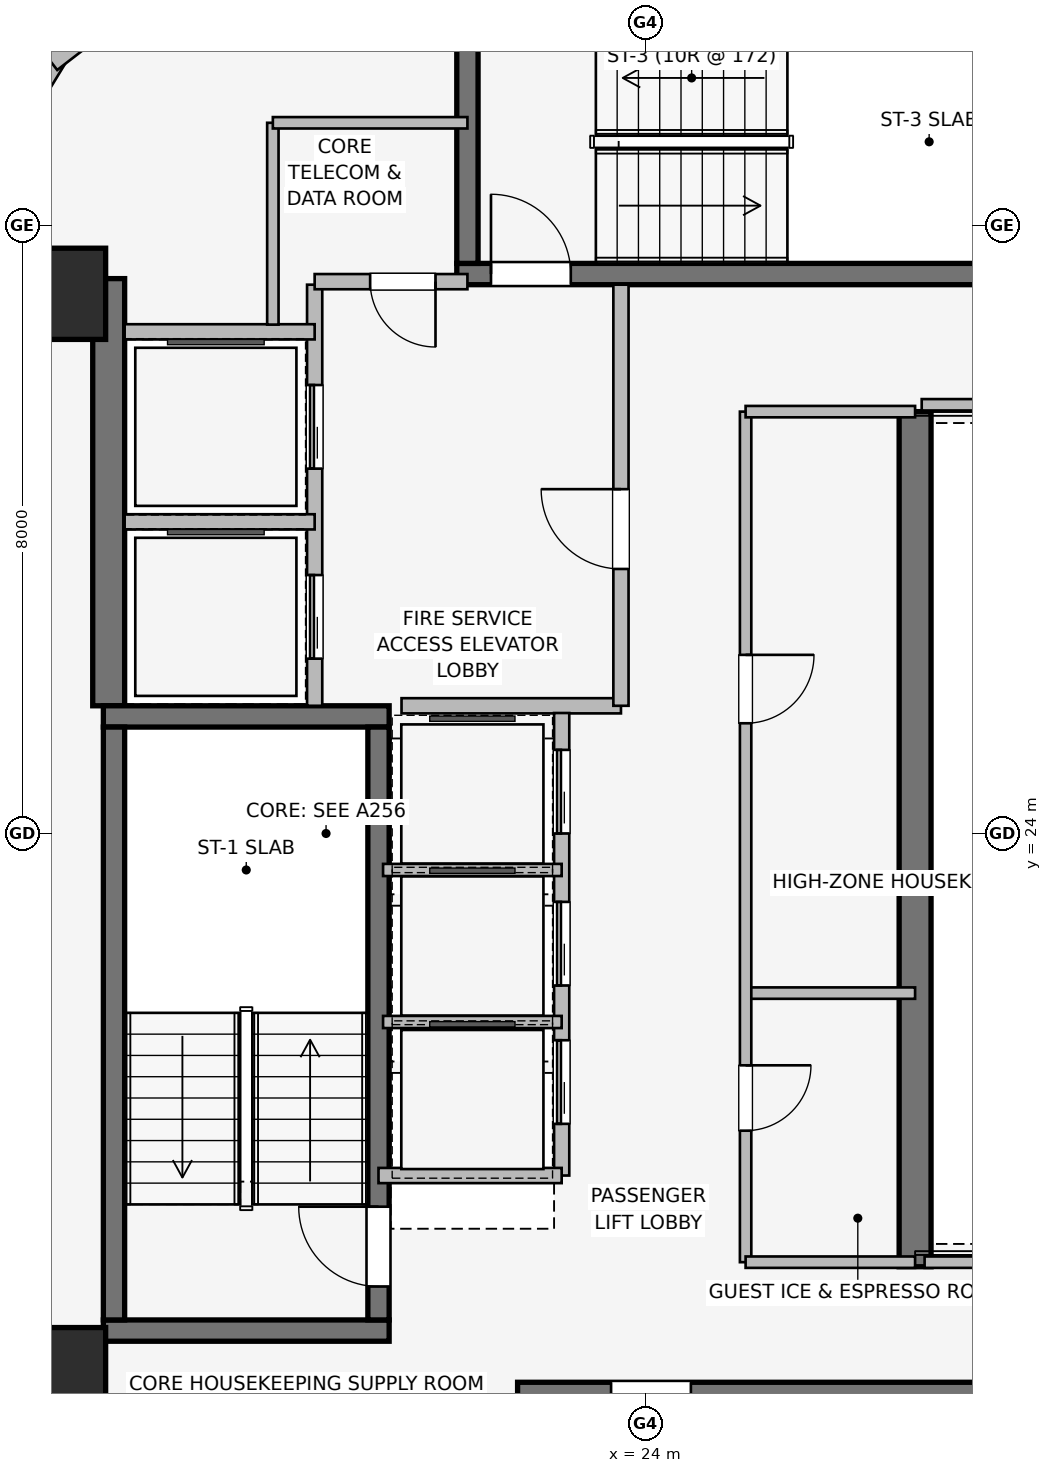
"""IFC4 building model, lengths in metres.
Left out: names, types, materials, properties, quantities, classifications, styles, units other than length and angle.
Written with IfcOpenShell. Run it as: python <this file> out.ifc"""

import sys

from ifc_helpers import new_model, si_unit, direction, frame, frame_2d, origin, origin_2d, place, context, subcontext, project, spatial, rectangle, extrude, element, fill, save


model = new_model("IFC4")
c1 = context("Model", 3, precision=1e-05, world=origin(), true_north=direction((0.0, 1.0)))
c2 = subcontext(c1, "Body", "Model", "MODEL_VIEW")
j1 = project(units=[si_unit("LENGTHUNIT", "METRE"), si_unit("PLANEANGLEUNIT", "RADIAN")], contexts=[c1])
p1 = place(None, origin())
s1 = spatial("IfcSite", under=j1, at=p1, CompositionType="ELEMENT")
p2 = place(p1, origin())
s2 = spatial("IfcBuilding", under=s1, at=p2, CompositionType="ELEMENT")
p3 = place(p2, frame((0.0, 0.0, 199.9)))
s3 = spatial("IfcBuildingStorey", under=s2, at=p3, CompositionType="ELEMENT", Elevation=199.9)
p4 = place(p3, frame((16.94, 25.68, 0.0), z_axis=(0.0, 0.0, 1.0), x_axis=(0.0, 1.0, 0.0)))
e1 = element("IfcWall", 1, at=p4, inside=s3, PredefinedType="SHEAR", context=c2, shape_type="SweptSolid", body=[
    extrude(rectangle(XDim=5.62, YDim=0.42, at=frame_2d((2.81, 0.0))), origin(), (0.0, 0.0, 1.0), 3.45),
])
p5 = place(p3, frame((27.55, 29.55, 0.0), z_axis=(0.0, 0.0, 1.0), x_axis=(0.0, -1.0, 0.0)))
e2 = element("IfcWall", 2, at=p5, inside=s3, PredefinedType="SHEAR", context=c2, shape_type="SweptSolid", body=[
    extrude(rectangle(XDim=11.25, YDim=0.42, at=frame_2d((5.625, 0.0))), origin(), (0.0, 0.0, 1.0), 3.45),
])
for number, where, z_axis, x_axis in (
    (3, (16.87, 17.46, 0.0), (0.0, 0.0, 1.0), (1.0, 0.0, 0.0)),
    (4, (20.63, 25.54, 0.0), (0.0, 0.0, 1.0), (-1.0, 0.0, 0.0)),
):
    element("IfcWall", number, at=place(p3, frame(where, z_axis=z_axis, x_axis=x_axis)), inside=s3, PredefinedType="SHEAR", context=c2, shape_type="SweptSolid", body=[
        extrude(rectangle(XDim=3.76, YDim=0.28, at=frame_2d((1.88, 0.0))), origin(), (0.0, 0.0, 1.0), 3.45),
    ])
p6 = place(p3, frame((17.01, 25.4, 0.0), z_axis=(0.0, 0.0, 1.0), x_axis=(0.0, -1.0, 0.0)))
e5 = element("IfcWall", 5, at=p6, inside=s3, PredefinedType="SHEAR", context=c2, shape_type="SweptSolid", body=[
    extrude(rectangle(XDim=7.8, YDim=0.28, at=frame_2d((3.9, 0.0))), origin(), (0.0, 0.0, 1.0), 3.45),
])
p7 = place(p3, frame((20.49, 17.6, 0.0), z_axis=(0.0, 0.0, 1.0), x_axis=(0.0, 1.0, 0.0)))
e6 = element("IfcWall", 6, at=p7, inside=s3, PredefinedType="SHEAR", context=c2, shape_type="SweptSolid", body=[
    extrude(rectangle(XDim=7.8, YDim=0.28, at=frame_2d((3.9, 0.0))), origin(), (0.0, 0.0, 1.0), 3.45),
])
p8 = place(p7, frame((0.44, 0.0, 0.0)))
e7 = element("IfcOpeningElement", 7, at=p8, cuts=e6, PredefinedType="OPENING", context=c2, shape_type="SweptSolid", body=[
    extrude(rectangle(XDim=1.05, YDim=2.0, at=frame_2d((0.525, 1.0))), frame((0.0, 0.15, 0.0), z_axis=(0.0, -1.0, 0.0), x_axis=(1.0, 0.0, 0.0)), (0.0, 0.0, 1.0), 0.3),
])
p9 = place(p3, frame((30.68, 16.64, 0.0), z_axis=(0.0, 0.0, 1.0), x_axis=(-1.0, 0.0, 0.0)))
e8 = element("IfcWall", 8, at=p9, inside=s3, PredefinedType="SHEAR", context=c2, shape_type="SweptSolid", body=[
    extrude(rectangle(XDim=8.36, YDim=0.28, at=frame_2d((4.18, 0.0))), origin(), (0.0, 0.0, 1.0), 3.45),
])
p10 = place(p9, frame((6.08, 0.0, 0.0)))
e9 = element("IfcOpeningElement", 9, at=p10, cuts=e8, PredefinedType="OPENING", context=c2, shape_type="SweptSolid", body=[
    extrude(rectangle(XDim=1.05, YDim=2.0, at=frame_2d((0.525, 1.0))), frame((0.0, 0.15, 0.0), z_axis=(0.0, -1.0, 0.0), x_axis=(1.0, 0.0, 0.0)), (0.0, 0.0, 1.0), 0.3),
])
p11 = place(p3, frame((21.52, 31.36, 0.0), z_axis=(0.0, 0.0, 1.0), x_axis=(1.0, 0.0, 0.0)))
e10 = element("IfcWall", 10, at=p11, inside=s3, PredefinedType="SHEAR", context=c2, shape_type="SweptSolid", body=[
    extrude(rectangle(XDim=8.36, YDim=0.28, at=frame_2d((4.18, 0.0))), origin(), (0.0, 0.0, 1.0), 3.45),
])
p12 = place(p11, frame((0.45, 0.0, 0.0)))
e11 = element("IfcOpeningElement", 11, at=p12, cuts=e10, PredefinedType="OPENING", context=c2, shape_type="SweptSolid", body=[
    extrude(rectangle(XDim=1.05, YDim=2.0, at=frame_2d((0.525, 1.0))), frame((0.0, 0.15, 0.0), z_axis=(0.0, -1.0, 0.0), x_axis=(1.0, 0.0, 0.0)), (0.0, 0.0, 1.0), 0.3),
])
p13 = place(p3, frame((21.66, 34.7, 0.0), z_axis=(0.0, 0.0, 1.0), x_axis=(0.0, -1.0, 0.0)))
e12 = element("IfcWall", 12, at=p13, inside=s3, PredefinedType="SHEAR", context=c2, shape_type="SweptSolid", body=[
    extrude(rectangle(XDim=3.2, YDim=0.28, at=frame_2d((1.6, 0.0))), origin(), (0.0, 0.0, 1.0), 3.45),
])
for number, where, z_axis, x_axis in (
    (13, (16.3, 16.9, 0.0), (0.0, 0.0, 1.0), (1.0, 0.0, 0.0)),
    (14, (16.3, 31.1, 0.0), (0.0, 0.0, 1.0), (1.0, 0.0, 0.0)),
):
    element("IfcColumn", number, at=place(p3, frame(where, z_axis=z_axis, x_axis=x_axis)), inside=s3, PredefinedType="COLUMN", context=c2, shape_type="SweptSolid", body=[
        extrude(rectangle(XDim=1.2, YDim=1.2, at=origin_2d()), origin(), (0.0, 0.0, 1.0), 3.45),
    ])
p14 = place(p3, frame((15.415, 32.882, 0.0), z_axis=(0.0, 0.0, 1.0), x_axis=(0.520325409202, 0.853968072318, 0.0)))
e15 = element("IfcWall", 15, at=p14, inside=s3, PredefinedType="STANDARD", context=c2, shape_type="SweptSolid", body=[
    extrude(rectangle(XDim=1.678, YDim=0.33, at=frame_2d((0.839, 0.0))), origin(), (0.0, 0.0, 1.0), 3.19),
])
p15 = place(p3, frame((16.162, 34.175, 0.0), z_axis=(0.0, 0.0, 1.0), x_axis=(0.791409877269, 0.611285862884, 0.0)))
e16 = element("IfcWall", 16, at=p15, inside=s3, PredefinedType="STANDARD", context=c2, shape_type="SweptSolid", body=[
    extrude(rectangle(XDim=1.677, YDim=0.33, at=frame_2d((0.838, 0.0))), origin(), (0.0, 0.0, 1.0), 3.19),
])
p16 = place(p3, frame((19.65, 25.68, 0.0), z_axis=(0.0, 0.0, 1.0), x_axis=(0.0, 1.0, 0.0)))
e17 = element("IfcWall", 17, at=p16, inside=s3, PredefinedType="PARTITIONING", context=c2, shape_type="SweptSolid", body=[
    extrude(rectangle(XDim=5.54, YDim=0.2, at=frame_2d((2.77, 0.0))), origin(), (0.0, 0.0, 1.0), 3.19),
])
p17 = place(p16, frame((0.62, 0.0, 0.0)))
e18 = element("IfcOpeningElement", 18, at=p17, cuts=e17, PredefinedType="OPENING", context=c2, shape_type="SweptSolid", body=[
    extrude(rectangle(XDim=1.1, YDim=2.2, at=frame_2d((0.55, 1.1))), frame((0.0, 0.11, 0.0), z_axis=(0.0, -1.0, 0.0), x_axis=(1.0, 0.0, 0.0)), (0.0, 0.0, 1.0), 0.22),
])
p18 = place(p16, frame((3.12, 0.0, 0.0)))
e19 = element("IfcOpeningElement", 19, at=p18, cuts=e17, PredefinedType="OPENING", context=c2, shape_type="SweptSolid", body=[
    extrude(rectangle(XDim=1.1, YDim=2.2, at=frame_2d((0.55, 1.1))), frame((0.0, 0.11, 0.0), z_axis=(0.0, -1.0, 0.0), x_axis=(1.0, 0.0, 0.0)), (0.0, 0.0, 1.0), 0.22),
])
p19 = place(p3, frame((20.793, 25.68, 0.0), z_axis=(0.0, 0.0, 1.0), x_axis=(1.0, 0.0, 0.0)))
e20 = element("IfcWall", 20, at=p19, inside=s3, PredefinedType="PARTITIONING", context=c2, shape_type="SweptSolid", body=[
    extrude(rectangle(XDim=2.887, YDim=0.2, at=frame_2d((1.443, 0.0))), origin(), (0.0, 0.0, 1.0), 3.19),
])
p20 = place(p3, frame((23.68, 25.68, 0.0), z_axis=(0.0, 0.0, 1.0), x_axis=(0.0, 1.0, 0.0)))
e21 = element("IfcWall", 21, at=p20, inside=s3, PredefinedType="PARTITIONING", context=c2, shape_type="SweptSolid", body=[
    extrude(rectangle(XDim=5.54, YDim=0.2, at=frame_2d((2.77, 0.0))), origin(), (0.0, 0.0, 1.0), 3.19),
])
p21 = place(p20, frame((1.8, 0.0, 0.0)))
e22 = element("IfcOpeningElement", 22, at=p21, cuts=e21, PredefinedType="OPENING", context=c2, shape_type="SweptSolid", body=[
    extrude(rectangle(XDim=1.05, YDim=2.0, at=frame_2d((0.525, 1.0))), frame((0.0, 0.11, 0.0), z_axis=(0.0, -1.0, 0.0), x_axis=(1.0, 0.0, 0.0)), (0.0, 0.0, 1.0), 0.22),
])
p22 = place(p3, frame((21.66, 31.26, 0.0), z_axis=(0.0, 0.0, 1.0), x_axis=(-1.0, 0.0, 0.0)))
e23 = element("IfcWall", 23, at=p22, inside=s3, PredefinedType="PARTITIONING", context=c2, shape_type="SweptSolid", body=[
    extrude(rectangle(XDim=2.01, YDim=0.2, at=frame_2d((1.005, 0.0))), origin(), (0.0, 0.0, 1.0), 3.19),
])
p23 = place(p22, frame((0.42, 0.0, 0.0)))
e24 = element("IfcOpeningElement", 24, at=p23, cuts=e23, PredefinedType="OPENING", context=c2, shape_type="SweptSolid", body=[
    extrude(rectangle(XDim=0.86, YDim=2.0, at=frame_2d((0.43, 1.0))), frame((0.0, 0.11, 0.0), z_axis=(0.0, -1.0, 0.0), x_axis=(1.0, 0.0, 0.0)), (0.0, 0.0, 1.0), 0.22),
])
p24 = place(p3, frame((17.15, 28.1, 0.0), z_axis=(0.0, 0.0, 1.0), x_axis=(1.0, 0.0, 0.0)))
e25 = element("IfcWall", 25, at=p24, inside=s3, PredefinedType="PARTITIONING", context=c2, shape_type="SweptSolid", body=[
    extrude(rectangle(XDim=2.5, YDim=0.2, at=frame_2d((1.25, 0.0))), origin(), (0.0, 0.0, 1.0), 3.19),
])
p25 = place(p3, frame((19.65, 30.6, 0.0), z_axis=(0.0, 0.0, 1.0), x_axis=(-1.0, 0.0, 0.0)))
e26 = element("IfcWall", 26, at=p25, inside=s3, PredefinedType="PARTITIONING", context=c2, shape_type="SweptSolid", body=[
    extrude(rectangle(XDim=2.5, YDim=0.2, at=frame_2d((1.25, 0.0))), origin(), (0.0, 0.0, 1.0), 2.09),
])
p26 = place(p3, frame((22.9, 19.5, 0.0), z_axis=(0.0, 0.0, 1.0), x_axis=(0.0, 1.0, 0.0)))
e27 = element("IfcWall", 27, at=p26, inside=s3, PredefinedType="PARTITIONING", context=c2, shape_type="SweptSolid", body=[
    extrude(rectangle(XDim=6.085, YDim=0.2, at=frame_2d((3.042, 0.0))), origin(), (0.0, 0.0, 1.0), 3.19),
])
p27 = place(p26, frame((0.68, 0.0, 0.0)))
e28 = element("IfcOpeningElement", 28, at=p27, cuts=e27, PredefinedType="OPENING", context=c2, shape_type="SweptSolid", body=[
    extrude(rectangle(XDim=1.1, YDim=2.2, at=frame_2d((0.55, 1.1))), frame((0.0, 0.11, 0.0), z_axis=(0.0, -1.0, 0.0), x_axis=(1.0, 0.0, 0.0)), (0.0, 0.0, 1.0), 0.22),
])
p28 = place(p26, frame((2.5, 0.0, 0.0)))
e29 = element("IfcOpeningElement", 29, at=p28, cuts=e27, PredefinedType="OPENING", context=c2, shape_type="SweptSolid", body=[
    extrude(rectangle(XDim=1.1, YDim=2.2, at=frame_2d((0.55, 1.1))), frame((0.0, 0.11, 0.0), z_axis=(0.0, -1.0, 0.0), x_axis=(1.0, 0.0, 0.0)), (0.0, 0.0, 1.0), 0.22),
])
p29 = place(p26, frame((4.5, 0.0, 0.0)))
e30 = element("IfcOpeningElement", 30, at=p29, cuts=e27, PredefinedType="OPENING", context=c2, shape_type="SweptSolid", body=[
    extrude(rectangle(XDim=1.1, YDim=2.2, at=frame_2d((0.55, 1.1))), frame((0.0, 0.11, 0.0), z_axis=(0.0, -1.0, 0.0), x_axis=(1.0, 0.0, 0.0)), (0.0, 0.0, 1.0), 0.22),
])
p30 = place(p3, frame((20.49, 19.5, 0.0), z_axis=(0.0, 0.0, 1.0), x_axis=(1.0, 0.0, 0.0)))
e31 = element("IfcWall", 31, at=p30, inside=s3, PredefinedType="PARTITIONING", context=c2, shape_type="SweptSolid", body=[
    extrude(rectangle(XDim=2.41, YDim=0.2, at=frame_2d((1.205, 0.0))), origin(), (0.0, 0.0, 1.0), 2.09),
])
for number, where, z_axis, x_axis in (
    (32, (20.55, 21.52, 0.0), (0.0, 0.0, 1.0), (1.0, 0.0, 0.0)),
    (33, (20.55, 23.52, 0.0), (0.0, 0.0, 1.0), (1.0, 0.0, 0.0)),
):
    element("IfcWall", number, at=place(p3, frame(where, z_axis=z_axis, x_axis=x_axis)), inside=s3, PredefinedType="PARTITIONING", context=c2, shape_type="SweptSolid", body=[
        extrude(rectangle(XDim=2.35, YDim=0.16, at=frame_2d((1.175, 0.0))), origin(), (0.0, 0.0, 1.0), 3.19),
    ])
p31 = place(p3, frame((25.32, 21.9, 0.0), z_axis=(0.0, 0.0, 1.0), x_axis=(1.0, 0.0, 0.0)))
e34 = element("IfcWall", 34, at=p31, inside=s3, PredefinedType="PARTITIONING", context=c2, shape_type="SweptSolid", body=[
    extrude(rectangle(XDim=2.23, YDim=0.15, at=frame_2d((1.115, 0.0))), origin(), (0.0, 0.0, 1.0), 3.19),
])
p32 = place(p3, frame((25.32, 29.55, 0.0), z_axis=(0.0, 0.0, 1.0), x_axis=(0.0, -1.0, 0.0)))
e35 = element("IfcWall", 35, at=p32, inside=s3, PredefinedType="PARTITIONING", context=c2, shape_type="SweptSolid", body=[
    extrude(rectangle(XDim=11.19, YDim=0.15, at=frame_2d((5.595, 0.0))), origin(), (0.0, 0.0, 1.0), 3.19),
])
p33 = place(p32, frame((3.2, 0.0, 0.0)))
e36 = element("IfcOpeningElement", 36, at=p33, cuts=e35, PredefinedType="OPENING", context=c2, shape_type="SweptSolid", body=[
    extrude(rectangle(XDim=0.9, YDim=2.0, at=frame_2d((0.45, 1.0))), frame((0.0, 0.085, 0.0), z_axis=(0.0, -1.0, 0.0), x_axis=(1.0, 0.0, 0.0)), (0.0, 0.0, 1.0), 0.17),
])
p34 = place(p32, frame((8.6, 0.0, 0.0)))
e37 = element("IfcOpeningElement", 37, at=p34, cuts=e35, PredefinedType="OPENING", context=c2, shape_type="SweptSolid", body=[
    extrude(rectangle(XDim=0.86, YDim=2.0, at=frame_2d((0.43, 1.0))), frame((0.0, 0.085, 0.0), z_axis=(0.0, -1.0, 0.0), x_axis=(1.0, 0.0, 0.0)), (0.0, 0.0, 1.0), 0.17),
])
p35 = place(p3, frame((25.32, 18.36, 0.0), z_axis=(0.0, 0.0, 1.0), x_axis=(1.0, 0.0, 0.0)))
e38 = element("IfcWall", 38, at=p35, inside=s3, PredefinedType="PARTITIONING", context=c2, shape_type="SweptSolid", body=[
    extrude(rectangle(XDim=2.23, YDim=0.15, at=frame_2d((1.115, 0.0))), origin(), (0.0, 0.0, 1.0), 3.19),
])
p36 = place(p3, frame((27.55, 29.55, 0.0), z_axis=(0.0, 0.0, 1.0), x_axis=(-1.0, 0.0, 0.0)))
e39 = element("IfcWall", 39, at=p36, inside=s3, PredefinedType="PARTITIONING", context=c2, shape_type="SweptSolid", body=[
    extrude(rectangle(XDim=2.23, YDim=0.15, at=frame_2d((1.115, 0.0))), origin(), (0.0, 0.0, 1.0), 2.09),
])
p37 = place(p3, frame((19.1, 33.35, 0.0), z_axis=(0.0, 0.0, 1.0), x_axis=(0.0, -1.0, 0.0)))
e40 = element("IfcWall", 40, at=p37, inside=s3, PredefinedType="PARTITIONING", context=c2, shape_type="SweptSolid", body=[
    extrude(rectangle(XDim=2.655, YDim=0.15, at=frame_2d((1.328, 0.0))), origin(), (0.0, 0.0, 1.0), 3.19),
])
p38 = place(p3, frame((21.66, 33.35, 0.0), z_axis=(0.0, 0.0, 1.0), x_axis=(-1.0, 0.0, 0.0)))
e41 = element("IfcWall", 41, at=p38, inside=s3, PredefinedType="PARTITIONING", context=c2, shape_type="SweptSolid", body=[
    extrude(rectangle(XDim=2.56, YDim=0.15, at=frame_2d((1.28, 0.0))), origin(), (0.0, 0.0, 1.0), 3.19),
])
p39 = place(p3, frame((27.675, 18.36, 0.0), z_axis=(0.0, 0.0, 1.0), x_axis=(1.0, 0.0, 0.0)))
e42 = element("IfcWall", 42, at=p39, inside=s3, PredefinedType="PARTITIONING", context=c2, shape_type="SweptSolid", body=[
    extrude(rectangle(XDim=12.165, YDim=0.15, at=frame_2d((6.083, 0.0))), origin(), (0.0, 0.0, 1.0), 2.331),
])
p40 = place(p3, frame((39.84, 29.64, 0.0), z_axis=(0.0, 0.0, 1.0), x_axis=(-1.0, 0.0, 0.0)))
e43 = element("IfcWall", 43, at=p40, inside=s3, PredefinedType="PARTITIONING", context=c2, shape_type="SweptSolid", body=[
    extrude(rectangle(XDim=12.203, YDim=0.15, at=frame_2d((6.102, 0.0))), origin(), (0.0, 0.0, 1.0), 2.331),
])
p41 = place(p8, origin())
e44 = element("IfcDoor", 44, at=p41, inside=s3, OperationType="SINGLE_SWING_RIGHT", PredefinedType="DOOR", context=c2, shape_type="SweptSolid", body=[
    extrude(rectangle(XDim=1.05, YDim=2.0, at=frame_2d((0.525, 1.0))), frame((0.0, 0.025, 0.0), z_axis=(0.0, -1.0, 0.0), x_axis=(1.0, 0.0, 0.0)), (0.0, 0.0, 1.0), 0.05),
])
fill(e7, e44)
p42 = place(p10, origin())
e45 = element("IfcDoor", 45, at=p42, inside=s3, OperationType="SINGLE_SWING_RIGHT", PredefinedType="DOOR", context=c2, shape_type="SweptSolid", body=[
    extrude(rectangle(XDim=1.05, YDim=2.0, at=frame_2d((0.525, 1.0))), frame((0.0, 0.025, 0.0), z_axis=(0.0, -1.0, 0.0), x_axis=(1.0, 0.0, 0.0)), (0.0, 0.0, 1.0), 0.05),
])
fill(e9, e45)
p43 = place(p12, origin())
e46 = element("IfcDoor", 46, at=p43, inside=s3, OperationType="SINGLE_SWING_LEFT", PredefinedType="DOOR", context=c2, shape_type="SweptSolid", body=[
    extrude(rectangle(XDim=1.05, YDim=2.0, at=frame_2d((0.525, 1.0))), frame((0.0, 0.025, 0.0), z_axis=(0.0, -1.0, 0.0), x_axis=(1.0, 0.0, 0.0)), (0.0, 0.0, 1.0), 0.05),
])
fill(e11, e46)
p44 = place(p17, origin())
e47 = element("IfcDoor", 47, at=p44, inside=s3, OperationType="SLIDING_TO_LEFT", PredefinedType="DOOR", context=c2, shape_type="SweptSolid", body=[
    extrude(rectangle(XDim=1.1, YDim=2.2, at=frame_2d((0.55, 1.1))), frame((0.0, 0.025, 0.0), z_axis=(0.0, -1.0, 0.0), x_axis=(1.0, 0.0, 0.0)), (0.0, 0.0, 1.0), 0.05),
])
fill(e18, e47)
p45 = place(p18, origin())
e48 = element("IfcDoor", 48, at=p45, inside=s3, OperationType="SLIDING_TO_LEFT", PredefinedType="DOOR", context=c2, shape_type="SweptSolid", body=[
    extrude(rectangle(XDim=1.1, YDim=2.2, at=frame_2d((0.55, 1.1))), frame((0.0, 0.025, 0.0), z_axis=(0.0, -1.0, 0.0), x_axis=(1.0, 0.0, 0.0)), (0.0, 0.0, 1.0), 0.05),
])
fill(e19, e48)
p46 = place(p21, origin())
e49 = element("IfcDoor", 49, at=p46, inside=s3, OperationType="SINGLE_SWING_RIGHT", PredefinedType="DOOR", context=c2, shape_type="SweptSolid", body=[
    extrude(rectangle(XDim=1.05, YDim=2.0, at=frame_2d((0.525, 1.0))), frame((0.0, 0.025, 0.0), z_axis=(0.0, -1.0, 0.0), x_axis=(1.0, 0.0, 0.0)), (0.0, 0.0, 1.0), 0.05),
])
fill(e22, e49)
p47 = place(p23, origin())
e50 = element("IfcDoor", 50, at=p47, inside=s3, OperationType="SINGLE_SWING_LEFT", PredefinedType="DOOR", context=c2, shape_type="SweptSolid", body=[
    extrude(rectangle(XDim=0.86, YDim=2.0, at=frame_2d((0.43, 1.0))), frame((0.0, 0.025, 0.0), z_axis=(0.0, -1.0, 0.0), x_axis=(1.0, 0.0, 0.0)), (0.0, 0.0, 1.0), 0.05),
])
fill(e24, e50)
p48 = place(p27, origin())
e51 = element("IfcDoor", 51, at=p48, inside=s3, OperationType="SLIDING_TO_LEFT", PredefinedType="DOOR", context=c2, shape_type="SweptSolid", body=[
    extrude(rectangle(XDim=1.1, YDim=2.2, at=frame_2d((0.55, 1.1))), frame((0.0, 0.025, 0.0), z_axis=(0.0, -1.0, 0.0), x_axis=(1.0, 0.0, 0.0)), (0.0, 0.0, 1.0), 0.05),
])
fill(e28, e51)
p49 = place(p28, origin())
e52 = element("IfcDoor", 52, at=p49, inside=s3, OperationType="SLIDING_TO_LEFT", PredefinedType="DOOR", context=c2, shape_type="SweptSolid", body=[
    extrude(rectangle(XDim=1.1, YDim=2.2, at=frame_2d((0.55, 1.1))), frame((0.0, 0.025, 0.0), z_axis=(0.0, -1.0, 0.0), x_axis=(1.0, 0.0, 0.0)), (0.0, 0.0, 1.0), 0.05),
])
fill(e29, e52)
p50 = place(p29, origin())
e53 = element("IfcDoor", 53, at=p50, inside=s3, OperationType="SLIDING_TO_LEFT", PredefinedType="DOOR", context=c2, shape_type="SweptSolid", body=[
    extrude(rectangle(XDim=1.1, YDim=2.2, at=frame_2d((0.55, 1.1))), frame((0.0, 0.025, 0.0), z_axis=(0.0, -1.0, 0.0), x_axis=(1.0, 0.0, 0.0)), (0.0, 0.0, 1.0), 0.05),
])
fill(e30, e53)
p51 = place(p33, origin())
e54 = element("IfcDoor", 54, at=p51, inside=s3, OperationType="SINGLE_SWING_LEFT", PredefinedType="DOOR", context=c2, shape_type="SweptSolid", body=[
    extrude(rectangle(XDim=0.9, YDim=2.0, at=frame_2d((0.45, 1.0))), frame((0.0, 0.025, 0.0), z_axis=(0.0, -1.0, 0.0), x_axis=(1.0, 0.0, 0.0)), (0.0, 0.0, 1.0), 0.05),
])
fill(e36, e54)
p52 = place(p34, origin())
e55 = element("IfcDoor", 55, at=p52, inside=s3, OperationType="SINGLE_SWING_LEFT", PredefinedType="DOOR", context=c2, shape_type="SweptSolid", body=[
    extrude(rectangle(XDim=0.86, YDim=2.0, at=frame_2d((0.43, 1.0))), frame((0.0, 0.025, 0.0), z_axis=(0.0, -1.0, 0.0), x_axis=(1.0, 0.0, 0.0)), (0.0, 0.0, 1.0), 0.05),
])
fill(e37, e55)
save(model, sys.argv[1])
